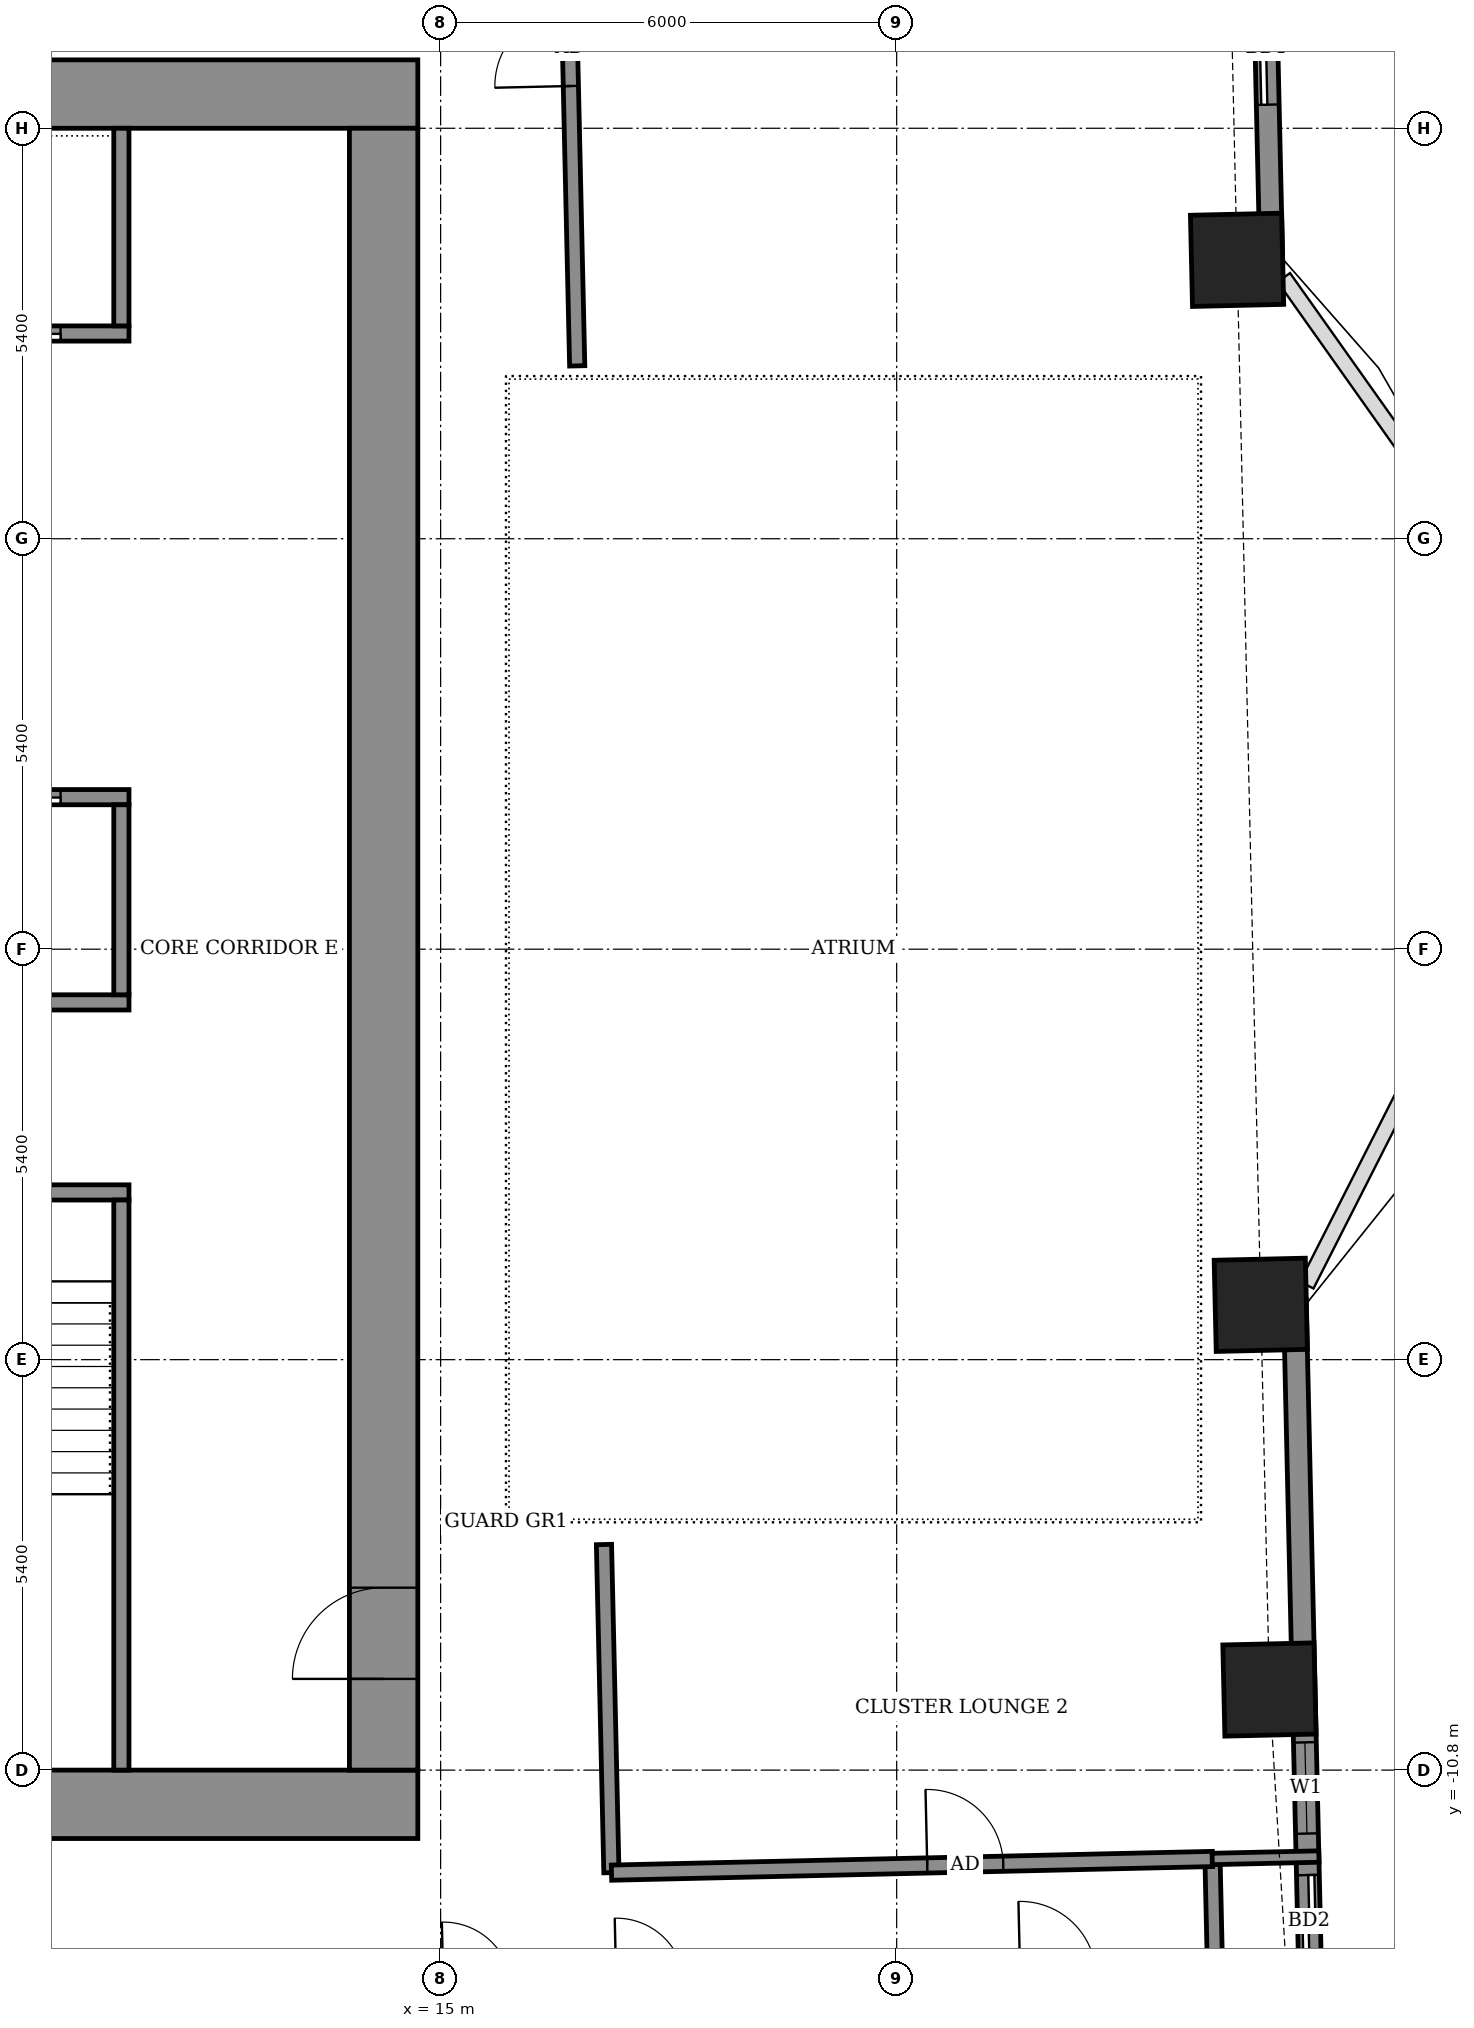
"""IFC4 building model, lengths in metres.
Left out: names, types, materials, properties, quantities, classifications, styles, units other than length and angle.
Written with IfcOpenShell. Run it as: python <this file> out.ifc"""

import sys

from ifc_helpers import new_model, si_unit, direction, frame, frame_2d, origin, origin_2d, place, context, subcontext, project, spatial, rectangle, extrude, element, fill, save


model = new_model("IFC4")
c1 = context("Model", 3, precision=1e-05, world=origin(), true_north=direction((0.0, 1.0)))
c2 = subcontext(c1, "Body", "Model", "MODEL_VIEW")
j1 = project(units=[si_unit("LENGTHUNIT", "METRE"), si_unit("PLANEANGLEUNIT", "RADIAN")], contexts=[c1])
p1 = place(None, origin())
s1 = spatial("IfcSite", under=j1, at=p1, CompositionType="ELEMENT")
p2 = place(p1, origin())
s2 = spatial("IfcBuilding", under=s1, at=p2, CompositionType="ELEMENT")
p3 = place(p2, frame((0.0, 0.0, 182.5)))
s3 = spatial("IfcBuildingStorey", under=s2, at=p3, CompositionType="ELEMENT", Elevation=182.5)
for number, where, z_axis, x_axis in (
    (1, (25.904, -9.74, -0.55), (0.0, 0.0, 1.0), (-0.023, 1.0, 0.0)),
    (2, (25.79, -4.678, -0.55), (0.0, 0.0, 1.0), (-0.023, 1.0, 0.0)),
    (3, (25.478, 9.069, -0.55), (0.0, 0.0, 1.0), (-0.023, 1.0, 0.0)),
):
    element("IfcColumn", number, at=place(p3, frame(where, z_axis=z_axis, x_axis=x_axis)), inside=s3, PredefinedType="COLUMN", context=c2, shape_type="SweptSolid", body=[
        extrude(rectangle(XDim=1.2, YDim=1.2, at=origin_2d()), origin(), (0.0, 0.0, 1.0), 3.6),
    ])
p4 = place(p3, frame((26.466, -14.64, 0.0), z_axis=(0.0, 0.0, 1.0), x_axis=(-0.022735782058, 0.999741508698, 0.0)))
e4 = element("IfcWall", 4, at=p4, inside=s3, PredefinedType="SOLIDWALL", context=c2, shape_type="SweptSolid", body=[
    extrude(rectangle(XDim=10.03, YDim=0.3, at=frame_2d((5.015, 0.0))), origin(), (0.0, 0.0, 1.0), 2.55),
])
p5 = place(p4, frame((1.26, 0.0, 0.0)))
e5 = element("IfcOpeningElement", 5, at=p5, cuts=e4, PredefinedType="OPENING", context=c2, shape_type="SweptSolid", body=[
    extrude(rectangle(XDim=1.2, YDim=2.4, at=frame_2d((0.6, 1.2))), frame((0.0, 0.16, 0.0), z_axis=(0.0, -1.0, 0.0), x_axis=(1.0, 0.0, 0.0)), (0.0, 0.0, 1.0), 0.32),
])
p6 = place(p4, frame((3.006, 0.0, 0.9)))
e6 = element("IfcOpeningElement", 6, at=p6, cuts=e4, PredefinedType="OPENING", context=c2, shape_type="SweptSolid", body=[
    extrude(rectangle(XDim=1.2, YDim=1.5, at=frame_2d((0.6, 0.75))), frame((0.0, 0.16, 0.0), z_axis=(0.0, -1.0, 0.0), x_axis=(1.0, 0.0, 0.0)), (0.0, 0.0, 1.0), 0.32),
])
p7 = place(p3, frame((25.929, 9.025, 0.0), z_axis=(0.0, 0.0, 1.0), x_axis=(-0.022667601583, 0.999743056909, 0.0)))
e7 = element("IfcWall", 7, at=p7, inside=s3, PredefinedType="SOLIDWALL", context=c2, shape_type="SweptSolid", body=[
    extrude(rectangle(XDim=11.029, YDim=0.3, at=frame_2d((5.515, 0.0))), origin(), (0.0, 0.0, 1.0), 3.05),
])
p8 = place(p7, frame((2.086, 0.0, 0.0)))
e8 = element("IfcOpeningElement", 8, at=p8, cuts=e7, PredefinedType="OPENING", context=c2, shape_type="SweptSolid", body=[
    extrude(rectangle(XDim=1.5, YDim=2.4, at=frame_2d((0.75, 1.2))), frame((0.0, 0.16, 0.0), z_axis=(0.0, -1.0, 0.0), x_axis=(1.0, 0.0, 0.0)), (0.0, 0.0, 1.0), 0.32),
])
p9 = place(p7, frame((7.353, 0.0, 0.9)))
e9 = element("IfcOpeningElement", 9, at=p9, cuts=e7, PredefinedType="OPENING", context=c2, shape_type="SweptSolid", body=[
    extrude(rectangle(XDim=0.9, YDim=1.5, at=frame_2d((0.45, 0.75))), frame((0.0, 0.16, 0.0), z_axis=(0.0, -1.0, 0.0), x_axis=(1.0, 0.0, 0.0)), (0.0, 0.0, 1.0), 0.32),
])
p10 = place(p7, frame((8.922, 0.0, 0.9)))
e10 = element("IfcOpeningElement", 10, at=p10, cuts=e7, PredefinedType="OPENING", context=c2, shape_type="SweptSolid", body=[
    extrude(rectangle(XDim=0.9, YDim=1.5, at=frame_2d((0.45, 0.75))), frame((0.0, 0.16, 0.0), z_axis=(0.0, -1.0, 0.0), x_axis=(1.0, 0.0, 0.0)), (0.0, 0.0, 1.0), 0.32),
])
p11 = place(p3, frame((25.189, -13.469, 0.0), z_axis=(0.0, 0.0, 1.0), x_axis=(-0.022617910375, 0.999744182344, 0.0)))
e11 = element("IfcWall", 11, at=p11, inside=s3, PredefinedType="PARTITIONING", context=c2, shape_type="SweptSolid", body=[
    extrude(rectangle(XDim=1.5, YDim=0.2, at=frame_2d((0.75, 0.0))), origin(), (0.0, 0.0, 1.0), 3.05),
])
p12 = place(p3, frame((17.247, -12.149, 0.0), z_axis=(0.0, 0.0, 1.0), x_axis=(-0.022729111383, 0.999741660378, 0.0)))
e12 = element("IfcWall", 12, at=p12, inside=s3, PredefinedType="PARTITIONING", context=c2, shape_type="SweptSolid", body=[
    extrude(rectangle(XDim=4.318, YDim=0.2, at=frame_2d((2.159, 0.0))), origin(), (0.0, 0.0, 1.0), 3.05),
])
p13 = place(p3, frame((17.248, -12.149, 0.0), z_axis=(0.0, 0.0, 1.0), x_axis=(0.999741181744, 0.022750154412, 0.0)))
e13 = element("IfcWall", 13, at=p13, inside=s3, PredefinedType="PARTITIONING", context=c2, shape_type="SweptSolid", body=[
    extrude(rectangle(XDim=7.909, YDim=0.2, at=frame_2d((3.955, 0.0))), origin(), (0.0, 0.0, 1.0), 3.05),
])
p14 = place(p13, frame((4.155, 0.0, 0.0)))
e14 = element("IfcOpeningElement", 14, at=p14, cuts=e13, PredefinedType="OPENING", context=c2, shape_type="SweptSolid", body=[
    extrude(rectangle(XDim=1.0, YDim=2.1, at=frame_2d((0.5, 1.05))), frame((0.0, 0.11, 0.0), z_axis=(0.0, -1.0, 0.0), x_axis=(1.0, 0.0, 0.0)), (0.0, 0.0, 1.0), 0.22),
])
p15 = place(p3, frame((25.151, -11.969, 0.0), z_axis=(0.0, 0.0, 1.0), x_axis=(0.999740667531, 0.022772739949, 0.0)))
e15 = element("IfcWall", 15, at=p15, inside=s3, PredefinedType="PARTITIONING", context=c2, shape_type="SweptSolid", body=[
    extrude(rectangle(XDim=1.404, YDim=0.15, at=frame_2d((0.702, 0.0))), origin(), (0.0, 0.0, 1.0), 2.55),
])
p16 = place(p3, frame((16.797, 7.674, 0.0), z_axis=(0.0, 0.0, 1.0), x_axis=(-0.022698399288, 0.999742358145, 0.0)))
e16 = element("IfcWall", 16, at=p16, inside=s3, PredefinedType="PARTITIONING", context=c2, shape_type="SweptSolid", body=[
    extrude(rectangle(XDim=8.196, YDim=0.2, at=frame_2d((4.098, 0.0))), origin(), (0.0, 0.0, 1.0), 3.05),
])
p17 = place(p16, frame((3.683, 0.0, 0.0)))
e17 = element("IfcOpeningElement", 17, at=p17, cuts=e16, PredefinedType="OPENING", context=c2, shape_type="SweptSolid", body=[
    extrude(rectangle(XDim=1.0, YDim=2.1, at=frame_2d((0.5, 1.05))), frame((0.0, 0.11, 0.0), z_axis=(0.0, -1.0, 0.0), x_axis=(1.0, 0.0, 0.0)), (0.0, 0.0, 1.0), 0.22),
])
for number, where, z_axis, x_axis in (
    (18, (-14.7, -11.25, 0.0), (0.0, 0.0, 1.0), (1.0, 0.0, 0.0)),
    (19, (-14.7, 11.25, 0.0), (0.0, 0.0, 1.0), (1.0, 0.0, 0.0)),
):
    element("IfcWall", number, at=place(p3, frame(where, z_axis=z_axis, x_axis=x_axis)), inside=s3, PredefinedType="SHEAR", context=c2, shape_type="SweptSolid", body=[
        extrude(rectangle(XDim=29.4, YDim=0.9, at=frame_2d((14.7, 0.0))), origin(), (0.0, 0.0, 1.0), 3.6),
    ])
p18 = place(p3, frame((14.25, -10.8, 0.0), z_axis=(0.0, 0.0, 1.0), x_axis=(0.0, 1.0, 0.0)))
e20 = element("IfcWall", 20, at=p18, inside=s3, PredefinedType="SHEAR", context=c2, shape_type="SweptSolid", body=[
    extrude(rectangle(XDim=21.6, YDim=0.9, at=frame_2d((10.8, 0.0))), origin(), (0.0, 0.0, 1.0), 3.6),
])
p19 = place(p18, frame((1.2, 0.0, 0.0)))
e21 = element("IfcOpeningElement", 21, at=p19, cuts=e20, PredefinedType="OPENING", context=c2, shape_type="SweptSolid", body=[
    extrude(rectangle(XDim=1.2, YDim=2.1, at=frame_2d((0.6, 1.05))), frame((0.0, 0.46, 0.0), z_axis=(0.0, -1.0, 0.0), x_axis=(1.0, 0.0, 0.0)), (0.0, 0.0, 1.0), 0.92),
])
p20 = place(p3, frame((-10.9, -3.2, 0.0), z_axis=(0.0, 0.0, 1.0), x_axis=(1.0, 0.0, 0.0)))
e22 = element("IfcWall", 22, at=p20, inside=s3, PredefinedType="SHEAR", context=c2, shape_type="SweptSolid", body=[
    extrude(rectangle(XDim=21.8, YDim=0.2, at=frame_2d((10.9, 0.0))), origin(), (0.0, 0.0, 1.0), 3.05),
])
p21 = place(p20, frame((1.075, 0.0, 0.0)))
e23 = element("IfcOpeningElement", 23, at=p21, cuts=e22, PredefinedType="OPENING", context=c2, shape_type="SweptSolid", body=[
    extrude(rectangle(XDim=1.1, YDim=2.1, at=frame_2d((0.55, 1.05))), frame((0.0, 0.11, 0.0), z_axis=(0.0, -1.0, 0.0), x_axis=(1.0, 0.0, 0.0)), (0.0, 0.0, 1.0), 0.22),
])
p22 = place(p20, frame((10.325, 0.0, 0.0)))
e24 = element("IfcOpeningElement", 24, at=p22, cuts=e22, PredefinedType="OPENING", context=c2, shape_type="SweptSolid", body=[
    extrude(rectangle(XDim=1.1, YDim=2.1, at=frame_2d((0.55, 1.05))), frame((0.0, 0.11, 0.0), z_axis=(0.0, -1.0, 0.0), x_axis=(1.0, 0.0, 0.0)), (0.0, 0.0, 1.0), 0.22),
])
p23 = place(p20, frame((19.625, 0.0, 0.0)))
e25 = element("IfcOpeningElement", 25, at=p23, cuts=e22, PredefinedType="OPENING", context=c2, shape_type="SweptSolid", body=[
    extrude(rectangle(XDim=1.1, YDim=2.1, at=frame_2d((0.55, 1.05))), frame((0.0, 0.11, 0.0), z_axis=(0.0, -1.0, 0.0), x_axis=(1.0, 0.0, 0.0)), (0.0, 0.0, 1.0), 0.22),
])
p24 = place(p20, frame((5.7, 0.0, 0.0)))
e26 = element("IfcOpeningElement", 26, at=p24, cuts=e22, PredefinedType="OPENING", context=c2, shape_type="SweptSolid", body=[
    extrude(rectangle(XDim=1.1, YDim=2.1, at=frame_2d((0.55, 1.05))), frame((0.0, 0.11, 0.0), z_axis=(0.0, -1.0, 0.0), x_axis=(1.0, 0.0, 0.0)), (0.0, 0.0, 1.0), 0.22),
])
p25 = place(p20, frame((14.975, 0.0, 0.0)))
e27 = element("IfcOpeningElement", 27, at=p25, cuts=e22, PredefinedType="OPENING", context=c2, shape_type="SweptSolid", body=[
    extrude(rectangle(XDim=1.1, YDim=2.1, at=frame_2d((0.55, 1.05))), frame((0.0, 0.11, 0.0), z_axis=(0.0, -1.0, 0.0), x_axis=(1.0, 0.0, 0.0)), (0.0, 0.0, 1.0), 0.22),
])
p26 = place(p3, frame((-10.9, -0.7, 0.0), z_axis=(0.0, 0.0, 1.0), x_axis=(1.0, 0.0, 0.0)))
e28 = element("IfcWall", 28, at=p26, inside=s3, PredefinedType="SHEAR", context=c2, shape_type="SweptSolid", body=[
    extrude(rectangle(XDim=21.8, YDim=0.2, at=frame_2d((10.9, 0.0))), origin(), (0.0, 0.0, 1.0), 3.05),
])
p27 = place(p3, frame((-10.9, 2.0, 0.0), z_axis=(0.0, 0.0, 1.0), x_axis=(1.0, 0.0, 0.0)))
e29 = element("IfcWall", 29, at=p27, inside=s3, PredefinedType="SHEAR", context=c2, shape_type="SweptSolid", body=[
    extrude(rectangle(XDim=21.8, YDim=0.2, at=frame_2d((10.9, 0.0))), origin(), (0.0, 0.0, 1.0), 3.05),
])
p28 = place(p27, frame((14.4, 0.0, 0.0)))
e30 = element("IfcOpeningElement", 30, at=p28, cuts=e29, PredefinedType="OPENING", context=c2, shape_type="SweptSolid", body=[
    extrude(rectangle(XDim=1.1, YDim=2.1, at=frame_2d((0.55, 1.05))), frame((0.0, 0.11, 0.0), z_axis=(0.0, -1.0, 0.0), x_axis=(1.0, 0.0, 0.0)), (0.0, 0.0, 1.0), 0.22),
])
p29 = place(p27, frame((17.1, 0.0, 0.0)))
e31 = element("IfcOpeningElement", 31, at=p29, cuts=e29, PredefinedType="OPENING", context=c2, shape_type="SweptSolid", body=[
    extrude(rectangle(XDim=1.1, YDim=2.1, at=frame_2d((0.55, 1.05))), frame((0.0, 0.11, 0.0), z_axis=(0.0, -1.0, 0.0), x_axis=(1.0, 0.0, 0.0)), (0.0, 0.0, 1.0), 0.22),
])
p30 = place(p27, frame((19.8, 0.0, 0.0)))
e32 = element("IfcOpeningElement", 32, at=p30, cuts=e29, PredefinedType="OPENING", context=c2, shape_type="SweptSolid", body=[
    extrude(rectangle(XDim=1.1, YDim=2.1, at=frame_2d((0.55, 1.05))), frame((0.0, 0.11, 0.0), z_axis=(0.0, -1.0, 0.0), x_axis=(1.0, 0.0, 0.0)), (0.0, 0.0, 1.0), 0.22),
])
p31 = place(p27, frame((2.35, 0.0, 0.0)))
e33 = element("IfcOpeningElement", 33, at=p31, cuts=e29, PredefinedType="OPENING", context=c2, shape_type="SweptSolid", body=[
    extrude(rectangle(XDim=0.9, YDim=2.1, at=frame_2d((0.45, 1.05))), frame((0.0, 0.11, 0.0), z_axis=(0.0, -1.0, 0.0), x_axis=(1.0, 0.0, 0.0)), (0.0, 0.0, 1.0), 0.22),
])
p32 = place(p27, frame((9.1, 0.0, 0.0)))
e34 = element("IfcOpeningElement", 34, at=p32, cuts=e29, PredefinedType="OPENING", context=c2, shape_type="SweptSolid", body=[
    extrude(rectangle(XDim=0.9, YDim=2.1, at=frame_2d((0.45, 1.05))), frame((0.0, 0.11, 0.0), z_axis=(0.0, -1.0, 0.0), x_axis=(1.0, 0.0, 0.0)), (0.0, 0.0, 1.0), 0.22),
])
p33 = place(p3, frame((-10.9, 8.1, 0.0), z_axis=(0.0, 0.0, 1.0), x_axis=(1.0, 0.0, 0.0)))
e35 = element("IfcWall", 35, at=p33, inside=s3, PredefinedType="SHEAR", context=c2, shape_type="SweptSolid", body=[
    extrude(rectangle(XDim=21.8, YDim=0.2, at=frame_2d((10.9, 0.0))), origin(), (0.0, 0.0, 1.0), 3.05),
])
p34 = place(p33, frame((14.4, 0.0, 0.0)))
e36 = element("IfcOpeningElement", 36, at=p34, cuts=e35, PredefinedType="OPENING", context=c2, shape_type="SweptSolid", body=[
    extrude(rectangle(XDim=1.1, YDim=2.1, at=frame_2d((0.55, 1.05))), frame((0.0, 0.11, 0.0), z_axis=(0.0, -1.0, 0.0), x_axis=(1.0, 0.0, 0.0)), (0.0, 0.0, 1.0), 0.22),
])
p35 = place(p33, frame((17.1, 0.0, 0.0)))
e37 = element("IfcOpeningElement", 37, at=p35, cuts=e35, PredefinedType="OPENING", context=c2, shape_type="SweptSolid", body=[
    extrude(rectangle(XDim=1.1, YDim=2.1, at=frame_2d((0.55, 1.05))), frame((0.0, 0.11, 0.0), z_axis=(0.0, -1.0, 0.0), x_axis=(1.0, 0.0, 0.0)), (0.0, 0.0, 1.0), 0.22),
])
p36 = place(p33, frame((19.8, 0.0, 0.0)))
e38 = element("IfcOpeningElement", 38, at=p36, cuts=e35, PredefinedType="OPENING", context=c2, shape_type="SweptSolid", body=[
    extrude(rectangle(XDim=1.1, YDim=2.1, at=frame_2d((0.55, 1.05))), frame((0.0, 0.11, 0.0), z_axis=(0.0, -1.0, 0.0), x_axis=(1.0, 0.0, 0.0)), (0.0, 0.0, 1.0), 0.22),
])
p37 = place(p33, frame((2.35, 0.0, 0.0)))
e39 = element("IfcOpeningElement", 39, at=p37, cuts=e35, PredefinedType="OPENING", context=c2, shape_type="SweptSolid", body=[
    extrude(rectangle(XDim=0.9, YDim=2.1, at=frame_2d((0.45, 1.05))), frame((0.0, 0.11, 0.0), z_axis=(0.0, -1.0, 0.0), x_axis=(1.0, 0.0, 0.0)), (0.0, 0.0, 1.0), 0.22),
])
p38 = place(p33, frame((9.1, 0.0, 0.0)))
e40 = element("IfcOpeningElement", 40, at=p38, cuts=e35, PredefinedType="OPENING", context=c2, shape_type="SweptSolid", body=[
    extrude(rectangle(XDim=0.9, YDim=2.1, at=frame_2d((0.45, 1.05))), frame((0.0, 0.11, 0.0), z_axis=(0.0, -1.0, 0.0), x_axis=(1.0, 0.0, 0.0)), (0.0, 0.0, 1.0), 0.22),
])
p39 = place(p3, frame((10.8, -10.8, 0.0), z_axis=(0.0, 0.0, 1.0), x_axis=(0.0, 1.0, 0.0)))
e41 = element("IfcWall", 41, at=p39, inside=s3, PredefinedType="SHEAR", context=c2, shape_type="SweptSolid", body=[
    extrude(rectangle(XDim=7.5, YDim=0.2, at=frame_2d((3.75, 0.0))), origin(), (0.0, 0.0, 1.0), 3.05),
])
p40 = place(p3, frame((10.8, -0.6, 0.0), z_axis=(0.0, 0.0, 1.0), x_axis=(0.0, 1.0, 0.0)))
e42 = element("IfcWall", 42, at=p40, inside=s3, PredefinedType="SHEAR", context=c2, shape_type="SweptSolid", body=[
    extrude(rectangle(XDim=2.5, YDim=0.2, at=frame_2d((1.25, 0.0))), origin(), (0.0, 0.0, 1.0), 3.05),
])
p41 = place(p3, frame((10.8, 8.2, 0.0), z_axis=(0.0, 0.0, 1.0), x_axis=(0.0, 1.0, 0.0)))
e43 = element("IfcWall", 43, at=p41, inside=s3, PredefinedType="SHEAR", context=c2, shape_type="SweptSolid", body=[
    extrude(rectangle(XDim=2.6, YDim=0.2, at=frame_2d((1.3, 0.0))), origin(), (0.0, 0.0, 1.0), 3.05),
])
p42 = place(p5, origin())
e44 = element("IfcDoor", 44, at=p42, inside=s3, OperationType="SLIDING_TO_LEFT", PredefinedType="DOOR", context=c2, shape_type="SweptSolid", body=[
    extrude(rectangle(XDim=1.2, YDim=2.4, at=frame_2d((0.6, 1.2))), frame((0.0, 0.025, 0.0), z_axis=(0.0, -1.0, 0.0), x_axis=(1.0, 0.0, 0.0)), (0.0, 0.0, 1.0), 0.05),
])
fill(e5, e44)
p43 = place(p6, origin())
e45 = element("IfcWindow", 45, at=p43, inside=s3, PartitioningType="SINGLE_PANEL", PredefinedType="WINDOW", context=c2, shape_type="SweptSolid", body=[
    extrude(rectangle(XDim=1.2, YDim=1.5, at=frame_2d((0.6, 0.75))), frame((0.0, 0.03, 0.0), z_axis=(0.0, -1.0, 0.0), x_axis=(1.0, 0.0, 0.0)), (0.0, 0.0, 1.0), 0.06),
])
fill(e6, e45)
p44 = place(p8, origin())
e46 = element("IfcDoor", 46, at=p44, inside=s3, OperationType="SLIDING_TO_LEFT", PredefinedType="DOOR", context=c2, shape_type="SweptSolid", body=[
    extrude(rectangle(XDim=1.5, YDim=2.4, at=frame_2d((0.75, 1.2))), frame((0.0, 0.025, 0.0), z_axis=(0.0, -1.0, 0.0), x_axis=(1.0, 0.0, 0.0)), (0.0, 0.0, 1.0), 0.05),
])
fill(e8, e46)
p45 = place(p14, origin())
e47 = element("IfcDoor", 47, at=p45, inside=s3, OperationType="SINGLE_SWING_LEFT", PredefinedType="DOOR", context=c2, shape_type="SweptSolid", body=[
    extrude(rectangle(XDim=1.0, YDim=2.1, at=frame_2d((0.5, 1.05))), frame((0.0, 0.025, 0.0), z_axis=(0.0, -1.0, 0.0), x_axis=(1.0, 0.0, 0.0)), (0.0, 0.0, 1.0), 0.05),
])
fill(e14, e47)
p46 = place(p17, origin())
e48 = element("IfcDoor", 48, at=p46, inside=s3, OperationType="SINGLE_SWING_RIGHT", PredefinedType="DOOR", context=c2, shape_type="SweptSolid", body=[
    extrude(rectangle(XDim=1.0, YDim=2.1, at=frame_2d((0.5, 1.05))), frame((0.0, 0.025, 0.0), z_axis=(0.0, -1.0, 0.0), x_axis=(1.0, 0.0, 0.0)), (0.0, 0.0, 1.0), 0.05),
])
fill(e17, e48)
p47 = place(p19, origin())
e49 = element("IfcDoor", 49, at=p47, inside=s3, OperationType="DOUBLE_DOOR_SINGLE_SWING", PredefinedType="DOOR", context=c2, shape_type="SweptSolid", body=[
    extrude(rectangle(XDim=1.2, YDim=2.1, at=frame_2d((0.6, 1.05))), frame((0.0, 0.025, 0.0), z_axis=(0.0, -1.0, 0.0), x_axis=(1.0, 0.0, 0.0)), (0.0, 0.0, 1.0), 0.05),
])
fill(e21, e49)
p48 = place(p30, origin())
e50 = element("IfcDoor", 50, at=p48, inside=s3, OperationType="SLIDING_TO_LEFT", PredefinedType="DOOR", context=c2, shape_type="SweptSolid", body=[
    extrude(rectangle(XDim=1.1, YDim=2.1, at=frame_2d((0.55, 1.05))), frame((0.0, 0.025, 0.0), z_axis=(0.0, -1.0, 0.0), x_axis=(1.0, 0.0, 0.0)), (0.0, 0.0, 1.0), 0.05),
])
fill(e32, e50)
p49 = place(p36, origin())
e51 = element("IfcDoor", 51, at=p49, inside=s3, OperationType="SLIDING_TO_LEFT", PredefinedType="DOOR", context=c2, shape_type="SweptSolid", body=[
    extrude(rectangle(XDim=1.1, YDim=2.1, at=frame_2d((0.55, 1.05))), frame((0.0, 0.025, 0.0), z_axis=(0.0, -1.0, 0.0), x_axis=(1.0, 0.0, 0.0)), (0.0, 0.0, 1.0), 0.05),
])
fill(e38, e51)
save(model, sys.argv[1])
